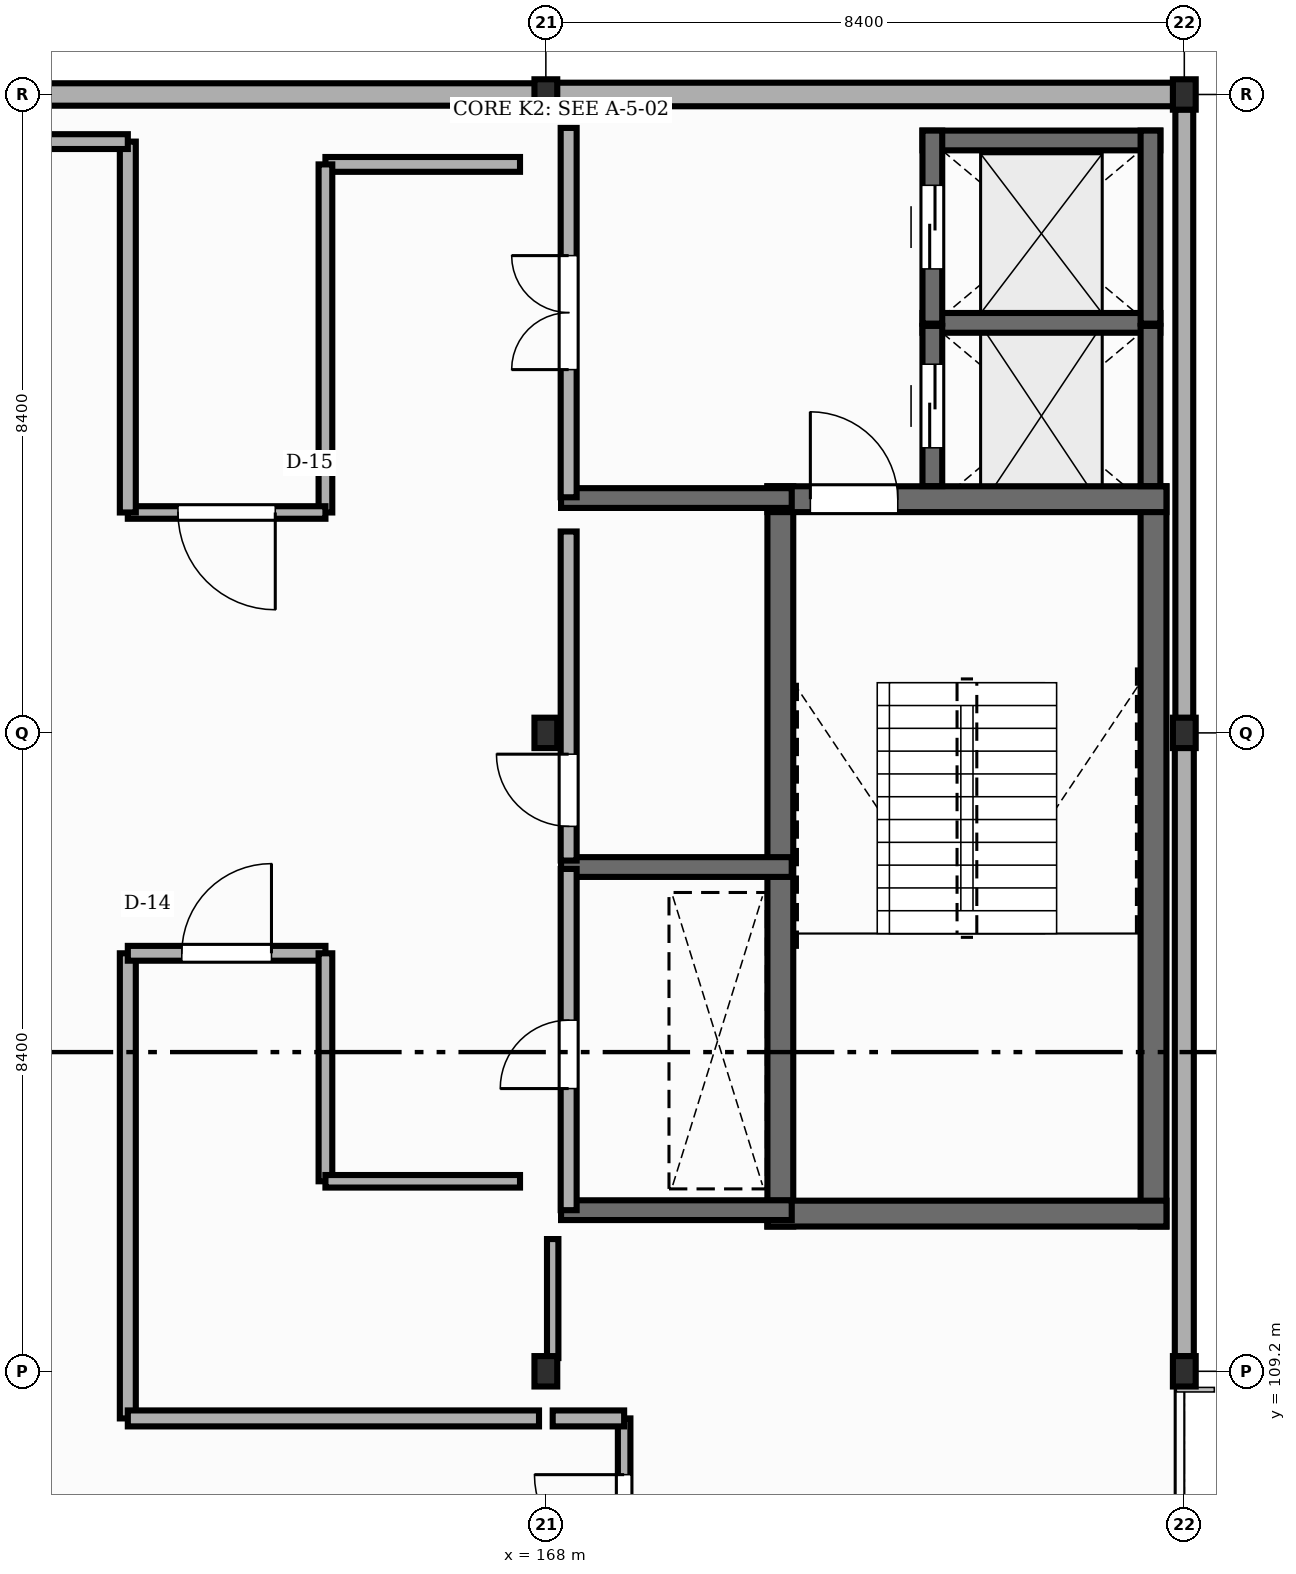
"""IFC4 building model, lengths in metres.
Left out: names, types, materials, properties, quantities, classifications, styles, units other than length and angle.
Written with IfcOpenShell. Run it as: python <this file> out.ifc"""

import sys

from ifc_helpers import new_model, si_unit, direction, frame, frame_2d, origin, origin_2d, place, context, subcontext, project, spatial, rectangle, i_section, extrude, element, fill, save


model = new_model("IFC4")
c1 = context("Model", 3, precision=1e-05, world=origin(), true_north=direction((0.0, 1.0)))
c2 = subcontext(c1, "Body", "Model", "MODEL_VIEW")
j1 = project(units=[si_unit("LENGTHUNIT", "METRE"), si_unit("PLANEANGLEUNIT", "RADIAN")], contexts=[c1])
p1 = place(None, origin())
s1 = spatial("IfcSite", under=j1, at=p1, CompositionType="ELEMENT")
p2 = place(p1, origin())
s2 = spatial("IfcBuilding", under=s1, at=p2, CompositionType="ELEMENT")
p3 = place(p2, frame((0.0, 0.0, 22.05)))
s3 = spatial("IfcBuildingStorey", under=s2, at=p3, CompositionType="ELEMENT", Elevation=22.05)
for number, where, z_axis, x_axis in (
    (1, (168.0, 109.2, 0.0), (0.0, 0.0, 1.0), (1.0, 0.0, 0.0)),
    (2, (168.0, 117.6, 0.0), (0.0, 0.0, 1.0), (1.0, 0.0, 0.0)),
    (3, (168.0, 126.0, 0.0), (0.0, 0.0, 1.0), (1.0, 0.0, 0.0)),
    (4, (176.4, 109.2, 0.0), (0.0, 0.0, 1.0), (1.0, 0.0, 0.0)),
    (5, (176.4, 117.6, 0.0), (0.0, 0.0, 1.0), (1.0, 0.0, 0.0)),
    (6, (176.4, 126.0, 0.0), (0.0, 0.0, 1.0), (1.0, 0.0, 0.0)),
):
    element("IfcColumn", number, at=place(p3, frame(where, z_axis=z_axis, x_axis=x_axis)), inside=s3, PredefinedType="COLUMN", context=c2, shape_type="SweptSolid", body=[
        extrude(i_section(OverallWidth=0.3, OverallDepth=0.4, WebThickness=0.013, FlangeThickness=0.024, FilletRadius=0.027, at=origin_2d()), origin(), (0.0, 0.0, 1.0), 4.05),
    ])
p4 = place(p3, frame((176.4, 109.396, 0.0), z_axis=(0.0, 0.0, 1.0), x_axis=(0.0, 1.0, 0.0)))
e7 = element("IfcWall", 7, at=p4, inside=s3, PredefinedType="STANDARD", context=c2, shape_type="SweptSolid", body=[
    extrude(rectangle(XDim=8.008, YDim=0.25, at=frame_2d((4.004, 0.0))), origin(), (0.0, 0.0, 1.0), 3.367),
])
p5 = place(p3, frame((176.4, 117.796, 0.0), z_axis=(0.0, 0.0, 1.0), x_axis=(0.0, 1.0, 0.0)))
e8 = element("IfcWall", 8, at=p5, inside=s3, PredefinedType="STANDARD", context=c2, shape_type="SweptSolid", body=[
    extrude(rectangle(XDim=8.008, YDim=0.235, at=frame_2d((4.004, 0.0))), origin(), (0.0, 0.0, 1.0), 3.457),
])
p6 = place(p3, frame((176.392, 126.0, 0.0), z_axis=(0.0, 0.0, 1.0), x_axis=(-1.0, 0.0, 0.0)))
e9 = element("IfcWall", 9, at=p6, inside=s3, PredefinedType="STANDARD", context=c2, shape_type="SweptSolid", body=[
    extrude(rectangle(XDim=8.384, YDim=0.31, at=frame_2d((4.192, 0.0))), origin(), (0.0, 0.0, 1.0), 3.527),
])
p7 = place(p3, frame((167.992, 126.0, 0.0), z_axis=(0.0, 0.0, 1.0), x_axis=(-1.0, 0.0, 0.0)))
e10 = element("IfcWall", 10, at=p7, inside=s3, PredefinedType="STANDARD", context=c2, shape_type="SweptSolid", body=[
    extrude(rectangle(XDim=8.384, YDim=0.295, at=frame_2d((4.192, 0.0))), origin(), (0.0, 0.0, 1.0), 3.497),
])
for number, where, z_axis, x_axis in (
    (11, (171.085, 111.105, 0.0), (0.0, 0.0, 1.0), (0.0, 1.0, 0.0)),
    (12, (175.995, 111.105, 0.0), (0.0, 0.0, 1.0), (0.0, 1.0, 0.0)),
):
    element("IfcWall", number, at=place(p3, frame(where, z_axis=z_axis, x_axis=x_axis)), inside=s3, PredefinedType="SHEAR", context=c2, shape_type="SweptSolid", body=[
        extrude(rectangle(XDim=9.74, YDim=0.34, at=frame_2d((4.87, 0.0))), origin(), (0.0, 0.0, 1.0), 3.85),
    ])
p8 = place(p3, frame((170.915, 111.275, 0.0), z_axis=(0.0, 0.0, 1.0), x_axis=(1.0, 0.0, 0.0)))
e13 = element("IfcWall", 13, at=p8, inside=s3, PredefinedType="SHEAR", context=c2, shape_type="SweptSolid", body=[
    extrude(rectangle(XDim=5.25, YDim=0.34, at=frame_2d((2.625, 0.0))), origin(), (0.0, 0.0, 1.0), 3.85),
])
p9 = place(p3, frame((170.915, 120.675, 0.0), z_axis=(0.0, 0.0, 1.0), x_axis=(1.0, 0.0, 0.0)))
e14 = element("IfcWall", 14, at=p9, inside=s3, PredefinedType="SHEAR", context=c2, shape_type="SweptSolid", body=[
    extrude(rectangle(XDim=5.25, YDim=0.34, at=frame_2d((2.625, 0.0))), origin(), (0.0, 0.0, 1.0), 3.85),
])
p10 = place(p9, frame((0.565, 0.0, 0.0)))
e15 = element("IfcOpeningElement", 15, at=p10, cuts=e14, PredefinedType="OPENING", context=c2, shape_type="SweptSolid", body=[
    extrude(rectangle(XDim=1.15, YDim=2.15, at=frame_2d((0.575, 1.075))), frame((0.0, 0.18, 0.0), z_axis=(0.0, -1.0, 0.0), x_axis=(1.0, 0.0, 0.0)), (0.0, 0.0, 1.0), 0.36),
])
p11 = place(p3, frame((172.955, 122.995, 0.0), z_axis=(0.0, 0.0, 1.0), x_axis=(1.0, 0.0, 0.0)))
e16 = element("IfcWall", 16, at=p11, inside=s3, PredefinedType="SHEAR", context=c2, shape_type="SweptSolid", body=[
    extrude(rectangle(XDim=3.13, YDim=0.26, at=frame_2d((1.565, 0.0))), origin(), (0.0, 0.0, 1.0), 3.85),
])
p12 = place(p3, frame((175.955, 120.847, 0.0), z_axis=(0.0, 0.0, 1.0), x_axis=(0.0, 1.0, 0.0)))
e17 = element("IfcWall", 17, at=p12, inside=s3, PredefinedType="SHEAR", context=c2, shape_type="SweptSolid", body=[
    extrude(rectangle(XDim=2.108, YDim=0.26, at=frame_2d((1.054, 0.0))), origin(), (0.0, 0.0, 1.0), 3.85),
])
p13 = place(p3, frame((173.085, 120.847, 0.0), z_axis=(0.0, 0.0, 1.0), x_axis=(0.0, 1.0, 0.0)))
e18 = element("IfcWall", 18, at=p13, inside=s3, PredefinedType="SHEAR", context=c2, shape_type="SweptSolid", body=[
    extrude(rectangle(XDim=2.108, YDim=0.26, at=frame_2d((1.054, 0.0))), origin(), (0.0, 0.0, 1.0), 3.85),
])
p14 = place(p13, frame((0.504, 0.0, 0.0)))
e19 = element("IfcOpeningElement", 19, at=p14, cuts=e18, PredefinedType="OPENING", context=c2, shape_type="SweptSolid", body=[
    extrude(rectangle(XDim=1.1, YDim=2.15, at=frame_2d((0.55, 1.075))), frame((0.0, 0.14, 0.0), z_axis=(0.0, -1.0, 0.0), x_axis=(1.0, 0.0, 0.0)), (0.0, 0.0, 1.0), 0.28),
])
p15 = place(p3, frame((172.955, 125.395, 0.0), z_axis=(0.0, 0.0, 1.0), x_axis=(1.0, 0.0, 0.0)))
e20 = element("IfcWall", 20, at=p15, inside=s3, PredefinedType="SHEAR", context=c2, shape_type="SweptSolid", body=[
    extrude(rectangle(XDim=3.13, YDim=0.26, at=frame_2d((1.565, 0.0))), origin(), (0.0, 0.0, 1.0), 3.85),
])
p16 = place(p3, frame((175.955, 122.985, 0.0), z_axis=(0.0, 0.0, 1.0), x_axis=(0.0, 1.0, 0.0)))
e21 = element("IfcWall", 21, at=p16, inside=s3, PredefinedType="SHEAR", context=c2, shape_type="SweptSolid", body=[
    extrude(rectangle(XDim=2.54, YDim=0.26, at=frame_2d((1.27, 0.0))), origin(), (0.0, 0.0, 1.0), 3.85),
])
p17 = place(p3, frame((173.085, 122.985, 0.0), z_axis=(0.0, 0.0, 1.0), x_axis=(0.0, 1.0, 0.0)))
e22 = element("IfcWall", 22, at=p17, inside=s3, PredefinedType="SHEAR", context=c2, shape_type="SweptSolid", body=[
    extrude(rectangle(XDim=2.54, YDim=0.26, at=frame_2d((1.27, 0.0))), origin(), (0.0, 0.0, 1.0), 3.85),
])
p18 = place(p17, frame((0.72, 0.0, 0.0)))
e23 = element("IfcOpeningElement", 23, at=p18, cuts=e22, PredefinedType="OPENING", context=c2, shape_type="SweptSolid", body=[
    extrude(rectangle(XDim=1.1, YDim=2.15, at=frame_2d((0.55, 1.075))), frame((0.0, 0.14, 0.0), z_axis=(0.0, -1.0, 0.0), x_axis=(1.0, 0.0, 0.0)), (0.0, 0.0, 1.0), 0.28),
])
for number, where, z_axis, x_axis in (
    (24, (168.2, 111.32, 0.0), (0.0, 0.0, 1.0), (1.0, 0.0, 0.0)),
    (25, (168.2, 115.835, 0.0), (0.0, 0.0, 1.0), (1.0, 0.0, 0.0)),
    (26, (168.2, 120.69, 0.0), (0.0, 0.0, 1.0), (1.0, 0.0, 0.0)),
):
    element("IfcWall", number, at=place(p3, frame(where, z_axis=z_axis, x_axis=x_axis)), inside=s3, PredefinedType="SHEAR", context=c2, shape_type="SweptSolid", body=[
        extrude(rectangle(XDim=3.035, YDim=0.26, at=frame_2d((1.518, 0.0))), origin(), (0.0, 0.0, 1.0), 3.85),
    ])
p19 = place(p3, frame((168.3, 111.32, 0.0), z_axis=(0.0, 0.0, 1.0), x_axis=(0.0, 1.0, 0.0)))
e27 = element("IfcWall", 27, at=p19, inside=s3, PredefinedType="STANDARD", context=c2, shape_type="SweptSolid", body=[
    extrude(rectangle(XDim=4.49, YDim=0.21, at=frame_2d((2.245, 0.0))), origin(), (0.0, 0.0, 1.0), 3.257),
])
p20 = place(p19, frame((1.6, 0.0, 0.0)))
e28 = element("IfcOpeningElement", 28, at=p20, cuts=e27, PredefinedType="OPENING", context=c2, shape_type="SweptSolid", body=[
    extrude(rectangle(XDim=0.9, YDim=2.1, at=frame_2d((0.45, 1.05))), frame((0.0, 0.115, 0.0), z_axis=(0.0, -1.0, 0.0), x_axis=(1.0, 0.0, 0.0)), (0.0, 0.0, 1.0), 0.23),
])
p21 = place(p3, frame((168.3, 115.92, 0.0), z_axis=(0.0, 0.0, 1.0), x_axis=(0.0, 1.0, 0.0)))
e29 = element("IfcWall", 29, at=p21, inside=s3, PredefinedType="STANDARD", context=c2, shape_type="SweptSolid", body=[
    extrude(rectangle(XDim=4.33, YDim=0.21, at=frame_2d((2.165, 0.0))), origin(), (0.0, 0.0, 1.0), 3.257),
])
p22 = place(p21, frame((0.45, 0.0, 0.0)))
e30 = element("IfcOpeningElement", 30, at=p22, cuts=e29, PredefinedType="OPENING", context=c2, shape_type="SweptSolid", body=[
    extrude(rectangle(XDim=0.95, YDim=2.15, at=frame_2d((0.475, 1.075))), frame((0.0, 0.115, 0.0), z_axis=(0.0, -1.0, 0.0), x_axis=(1.0, 0.0, 0.0)), (0.0, 0.0, 1.0), 0.23),
])
p23 = place(p3, frame((168.3, 120.7, 0.0), z_axis=(0.0, 0.0, 1.0), x_axis=(0.0, 1.0, 0.0)))
e31 = element("IfcWall", 31, at=p23, inside=s3, PredefinedType="STANDARD", context=c2, shape_type="SweptSolid", body=[
    extrude(rectangle(XDim=4.86, YDim=0.21, at=frame_2d((2.43, 0.0))), origin(), (0.0, 0.0, 1.0), 3.367),
])
p24 = place(p23, frame((1.68, 0.0, 0.0)))
e32 = element("IfcOpeningElement", 32, at=p24, cuts=e31, PredefinedType="OPENING", context=c2, shape_type="SweptSolid", body=[
    extrude(rectangle(XDim=1.5, YDim=2.2, at=frame_2d((0.75, 1.1))), frame((0.0, 0.115, 0.0), z_axis=(0.0, -1.0, 0.0), x_axis=(1.0, 0.0, 0.0)), (0.0, 0.0, 1.0), 0.23),
])
p25 = place(p3, frame((169.03, 106.3, -0.004), z_axis=(0.0, 0.0, 1.0), x_axis=(0.0, 1.0, 0.0)))
e33 = element("IfcWall", 33, at=p25, inside=s3, PredefinedType="STANDARD", context=c2, shape_type="SweptSolid", body=[
    extrude(rectangle(XDim=2.28, YDim=0.165, at=frame_2d((1.14, 0.0))), origin(), (0.0, 0.0, 1.0), 3.854),
])
p26 = place(p25, frame((0.36, 0.0, 0.0)))
e34 = element("IfcOpeningElement", 34, at=p26, cuts=e33, PredefinedType="OPENING", context=c2, shape_type="SweptSolid", body=[
    extrude(rectangle(XDim=1.18, YDim=2.3, at=frame_2d((0.59, 1.15))), frame((0.0, 0.093, 0.0), z_axis=(0.0, -1.0, 0.0), x_axis=(1.0, 0.0, 0.0)), (0.0, 0.0, 1.0), 0.185),
])
p27 = place(p3, frame((169.03, 108.58, -0.004), z_axis=(0.0, 0.0, 1.0), x_axis=(-1.0, 0.0, 0.0)))
e35 = element("IfcWall", 35, at=p27, inside=s3, PredefinedType="STANDARD", context=c2, shape_type="SweptSolid", body=[
    extrude(rectangle(XDim=0.94, YDim=0.21, at=frame_2d((0.47, 0.0))), origin(), (0.0, 0.0, 1.0), 3.854),
])
p28 = place(p3, frame((168.09, 109.374, -0.004), z_axis=(0.0, 0.0, 1.0), x_axis=(0.0, 1.0, 0.0)))
e36 = element("IfcWall", 36, at=p28, inside=s3, PredefinedType="STANDARD", context=c2, shape_type="SweptSolid", body=[
    extrude(rectangle(XDim=1.566, YDim=0.15, at=frame_2d((0.783, 0.0))), origin(), (0.0, 0.0, 1.0), 3.261),
])
p29 = place(p3, frame((162.5, 108.58, -0.004), z_axis=(0.0, 0.0, 1.0), x_axis=(0.0, 1.0, 0.0)))
e37 = element("IfcWall", 37, at=p29, inside=s3, PredefinedType="STANDARD", context=c2, shape_type="SweptSolid", body=[
    extrude(rectangle(XDim=6.12, YDim=0.21, at=frame_2d((3.06, 0.0))), origin(), (0.0, 0.0, 1.0), 3.621),
])
p30 = place(p3, frame((162.5, 114.7, -0.004), z_axis=(0.0, 0.0, 1.0), x_axis=(1.0, 0.0, 0.0)))
e38 = element("IfcWall", 38, at=p30, inside=s3, PredefinedType="STANDARD", context=c2, shape_type="SweptSolid", body=[
    extrude(rectangle(XDim=2.6, YDim=0.195, at=frame_2d((1.3, 0.0))), origin(), (0.0, 0.0, 1.0), 3.854),
])
p31 = place(p30, frame((0.71, 0.0, 0.0)))
e39 = element("IfcOpeningElement", 39, at=p31, cuts=e38, PredefinedType="OPENING", context=c2, shape_type="SweptSolid", body=[
    extrude(rectangle(XDim=1.18, YDim=2.14, at=frame_2d((0.59, 1.07))), frame((0.0, 0.107, 0.0), z_axis=(0.0, -1.0, 0.0), x_axis=(1.0, 0.0, 0.0)), (0.0, 0.0, 1.0), 0.215),
])
p32 = place(p3, frame((165.1, 114.7, -0.004), z_axis=(0.0, 0.0, 1.0), x_axis=(0.0, -1.0, 0.0)))
e40 = element("IfcWall", 40, at=p32, inside=s3, PredefinedType="STANDARD", context=c2, shape_type="SweptSolid", body=[
    extrude(rectangle(XDim=3.0, YDim=0.18, at=frame_2d((1.5, 0.0))), origin(), (0.0, 0.0, 1.0), 3.641),
])
p33 = place(p3, frame((165.1, 111.7, -0.004), z_axis=(0.0, 0.0, 1.0), x_axis=(1.0, 0.0, 0.0)))
e41 = element("IfcWall", 41, at=p33, inside=s3, PredefinedType="STANDARD", context=c2, shape_type="SweptSolid", body=[
    extrude(rectangle(XDim=2.56, YDim=0.165, at=frame_2d((1.28, 0.0))), origin(), (0.0, 0.0, 1.0), 3.854),
])
p34 = place(p3, frame((167.91, 108.58, -0.004), z_axis=(0.0, 0.0, 1.0), x_axis=(-1.0, 0.0, 0.0)))
e42 = element("IfcWall", 42, at=p34, inside=s3, PredefinedType="STANDARD", context=c2, shape_type="SweptSolid", body=[
    extrude(rectangle(XDim=5.41, YDim=0.21, at=frame_2d((2.705, 0.0))), origin(), (0.0, 0.0, 1.0), 3.854),
])
p35 = place(p3, frame((167.66, 125.08, -0.004), z_axis=(0.0, 0.0, 1.0), x_axis=(-1.0, 0.0, 0.0)))
e43 = element("IfcWall", 43, at=p35, inside=s3, PredefinedType="STANDARD", context=c2, shape_type="SweptSolid", body=[
    extrude(rectangle(XDim=2.56, YDim=0.195, at=frame_2d((1.28, 0.0))), origin(), (0.0, 0.0, 1.0), 3.854),
])
p36 = place(p3, frame((165.1, 125.08, -0.004), z_axis=(0.0, 0.0, 1.0), x_axis=(0.0, -1.0, 0.0)))
e44 = element("IfcWall", 44, at=p36, inside=s3, PredefinedType="STANDARD", context=c2, shape_type="SweptSolid", body=[
    extrude(rectangle(XDim=4.58, YDim=0.18, at=frame_2d((2.29, 0.0))), origin(), (0.0, 0.0, 1.0), 3.561),
])
p37 = place(p3, frame((165.1, 120.5, -0.004), z_axis=(0.0, 0.0, 1.0), x_axis=(-1.0, 0.0, 0.0)))
e45 = element("IfcWall", 45, at=p37, inside=s3, PredefinedType="STANDARD", context=c2, shape_type="SweptSolid", body=[
    extrude(rectangle(XDim=2.6, YDim=0.165, at=frame_2d((1.3, 0.0))), origin(), (0.0, 0.0, 1.0), 3.854),
])
p38 = place(p37, frame((0.66, 0.0, 0.0)))
e46 = element("IfcOpeningElement", 46, at=p38, cuts=e45, PredefinedType="OPENING", context=c2, shape_type="SweptSolid", body=[
    extrude(rectangle(XDim=1.28, YDim=2.14, at=frame_2d((0.64, 1.07))), frame((0.0, 0.093, 0.0), z_axis=(0.0, -1.0, 0.0), x_axis=(1.0, 0.0, 0.0)), (0.0, 0.0, 1.0), 0.185),
])
p39 = place(p3, frame((162.5, 120.5, -0.004), z_axis=(0.0, 0.0, 1.0), x_axis=(0.0, 1.0, 0.0)))
e47 = element("IfcWall", 47, at=p39, inside=s3, PredefinedType="STANDARD", context=c2, shape_type="SweptSolid", body=[
    extrude(rectangle(XDim=4.88, YDim=0.21, at=frame_2d((2.44, 0.0))), origin(), (0.0, 0.0, 1.0), 3.561),
])
p40 = place(p3, frame((162.5, 125.38, -0.004), z_axis=(0.0, 0.0, 1.0), x_axis=(-1.0, 0.0, 0.0)))
e48 = element("IfcWall", 48, at=p40, inside=s3, PredefinedType="STANDARD", context=c2, shape_type="SweptSolid", body=[
    extrude(rectangle(XDim=2.28, YDim=0.195, at=frame_2d((1.14, 0.0))), origin(), (0.0, 0.0, 1.0), 3.854),
])
p41 = place(p10, origin())
e49 = element("IfcDoor", 49, at=p41, inside=s3, OperationType="SINGLE_SWING_LEFT", PredefinedType="DOOR", context=c2, shape_type="SweptSolid", body=[
    extrude(rectangle(XDim=1.15, YDim=2.15, at=frame_2d((0.575, 1.075))), frame((0.0, 0.025, 0.0), z_axis=(0.0, -1.0, 0.0), x_axis=(1.0, 0.0, 0.0)), (0.0, 0.0, 1.0), 0.05),
])
fill(e15, e49)
p42 = place(p14, origin())
e50 = element("IfcDoor", 50, at=p42, inside=s3, OperationType="DOUBLE_DOOR_SLIDING", PredefinedType="DOOR", context=c2, shape_type="SweptSolid", body=[
    extrude(rectangle(XDim=1.1, YDim=2.15, at=frame_2d((0.55, 1.075))), frame((0.0, 0.025, 0.0), z_axis=(0.0, -1.0, 0.0), x_axis=(1.0, 0.0, 0.0)), (0.0, 0.0, 1.0), 0.05),
])
fill(e19, e50)
p43 = place(p18, origin())
e51 = element("IfcDoor", 51, at=p43, inside=s3, OperationType="DOUBLE_DOOR_SLIDING", PredefinedType="DOOR", context=c2, shape_type="SweptSolid", body=[
    extrude(rectangle(XDim=1.1, YDim=2.15, at=frame_2d((0.55, 1.075))), frame((0.0, 0.025, 0.0), z_axis=(0.0, -1.0, 0.0), x_axis=(1.0, 0.0, 0.0)), (0.0, 0.0, 1.0), 0.05),
])
fill(e23, e51)
p44 = place(p20, origin())
e52 = element("IfcDoor", 52, at=p44, inside=s3, OperationType="SINGLE_SWING_LEFT", PredefinedType="DOOR", context=c2, shape_type="SweptSolid", body=[
    extrude(rectangle(XDim=0.9, YDim=2.1, at=frame_2d((0.45, 1.05))), frame((0.0, 0.025, 0.0), z_axis=(0.0, -1.0, 0.0), x_axis=(1.0, 0.0, 0.0)), (0.0, 0.0, 1.0), 0.05),
])
fill(e28, e52)
p45 = place(p22, origin())
e53 = element("IfcDoor", 53, at=p45, inside=s3, OperationType="SINGLE_SWING_RIGHT", PredefinedType="DOOR", context=c2, shape_type="SweptSolid", body=[
    extrude(rectangle(XDim=0.95, YDim=2.15, at=frame_2d((0.475, 1.075))), frame((0.0, 0.025, 0.0), z_axis=(0.0, -1.0, 0.0), x_axis=(1.0, 0.0, 0.0)), (0.0, 0.0, 1.0), 0.05),
])
fill(e30, e53)
p46 = place(p24, origin())
e54 = element("IfcDoor", 54, at=p46, inside=s3, OperationType="DOUBLE_DOOR_SINGLE_SWING", PredefinedType="DOOR", context=c2, shape_type="SweptSolid", body=[
    extrude(rectangle(XDim=1.5, YDim=2.2, at=frame_2d((0.75, 1.1))), frame((0.0, 0.025, 0.0), z_axis=(0.0, -1.0, 0.0), x_axis=(1.0, 0.0, 0.0)), (0.0, 0.0, 1.0), 0.05),
])
fill(e32, e54)
p47 = place(p26, origin())
e55 = element("IfcDoor", 55, at=p47, inside=s3, OperationType="SINGLE_SWING_RIGHT", PredefinedType="DOOR", context=c2, shape_type="SweptSolid", body=[
    extrude(rectangle(XDim=1.18, YDim=2.3, at=frame_2d((0.59, 1.15))), frame((0.0, 0.025, 0.0), z_axis=(0.0, -1.0, 0.0), x_axis=(1.0, 0.0, 0.0)), (0.0, 0.0, 1.0), 0.05),
])
fill(e34, e55)
p48 = place(p31, origin())
e56 = element("IfcDoor", 56, at=p48, inside=s3, OperationType="SINGLE_SWING_RIGHT", PredefinedType="DOOR", context=c2, shape_type="SweptSolid", body=[
    extrude(rectangle(XDim=1.18, YDim=2.14, at=frame_2d((0.59, 1.07))), frame((0.0, 0.025, 0.0), z_axis=(0.0, -1.0, 0.0), x_axis=(1.0, 0.0, 0.0)), (0.0, 0.0, 1.0), 0.05),
])
fill(e39, e56)
p49 = place(p38, origin())
e57 = element("IfcDoor", 57, at=p49, inside=s3, OperationType="SINGLE_SWING_LEFT", PredefinedType="DOOR", context=c2, shape_type="SweptSolid", body=[
    extrude(rectangle(XDim=1.28, YDim=2.14, at=frame_2d((0.64, 1.07))), frame((0.0, 0.025, 0.0), z_axis=(0.0, -1.0, 0.0), x_axis=(1.0, 0.0, 0.0)), (0.0, 0.0, 1.0), 0.05),
])
fill(e46, e57)
save(model, sys.argv[1])
